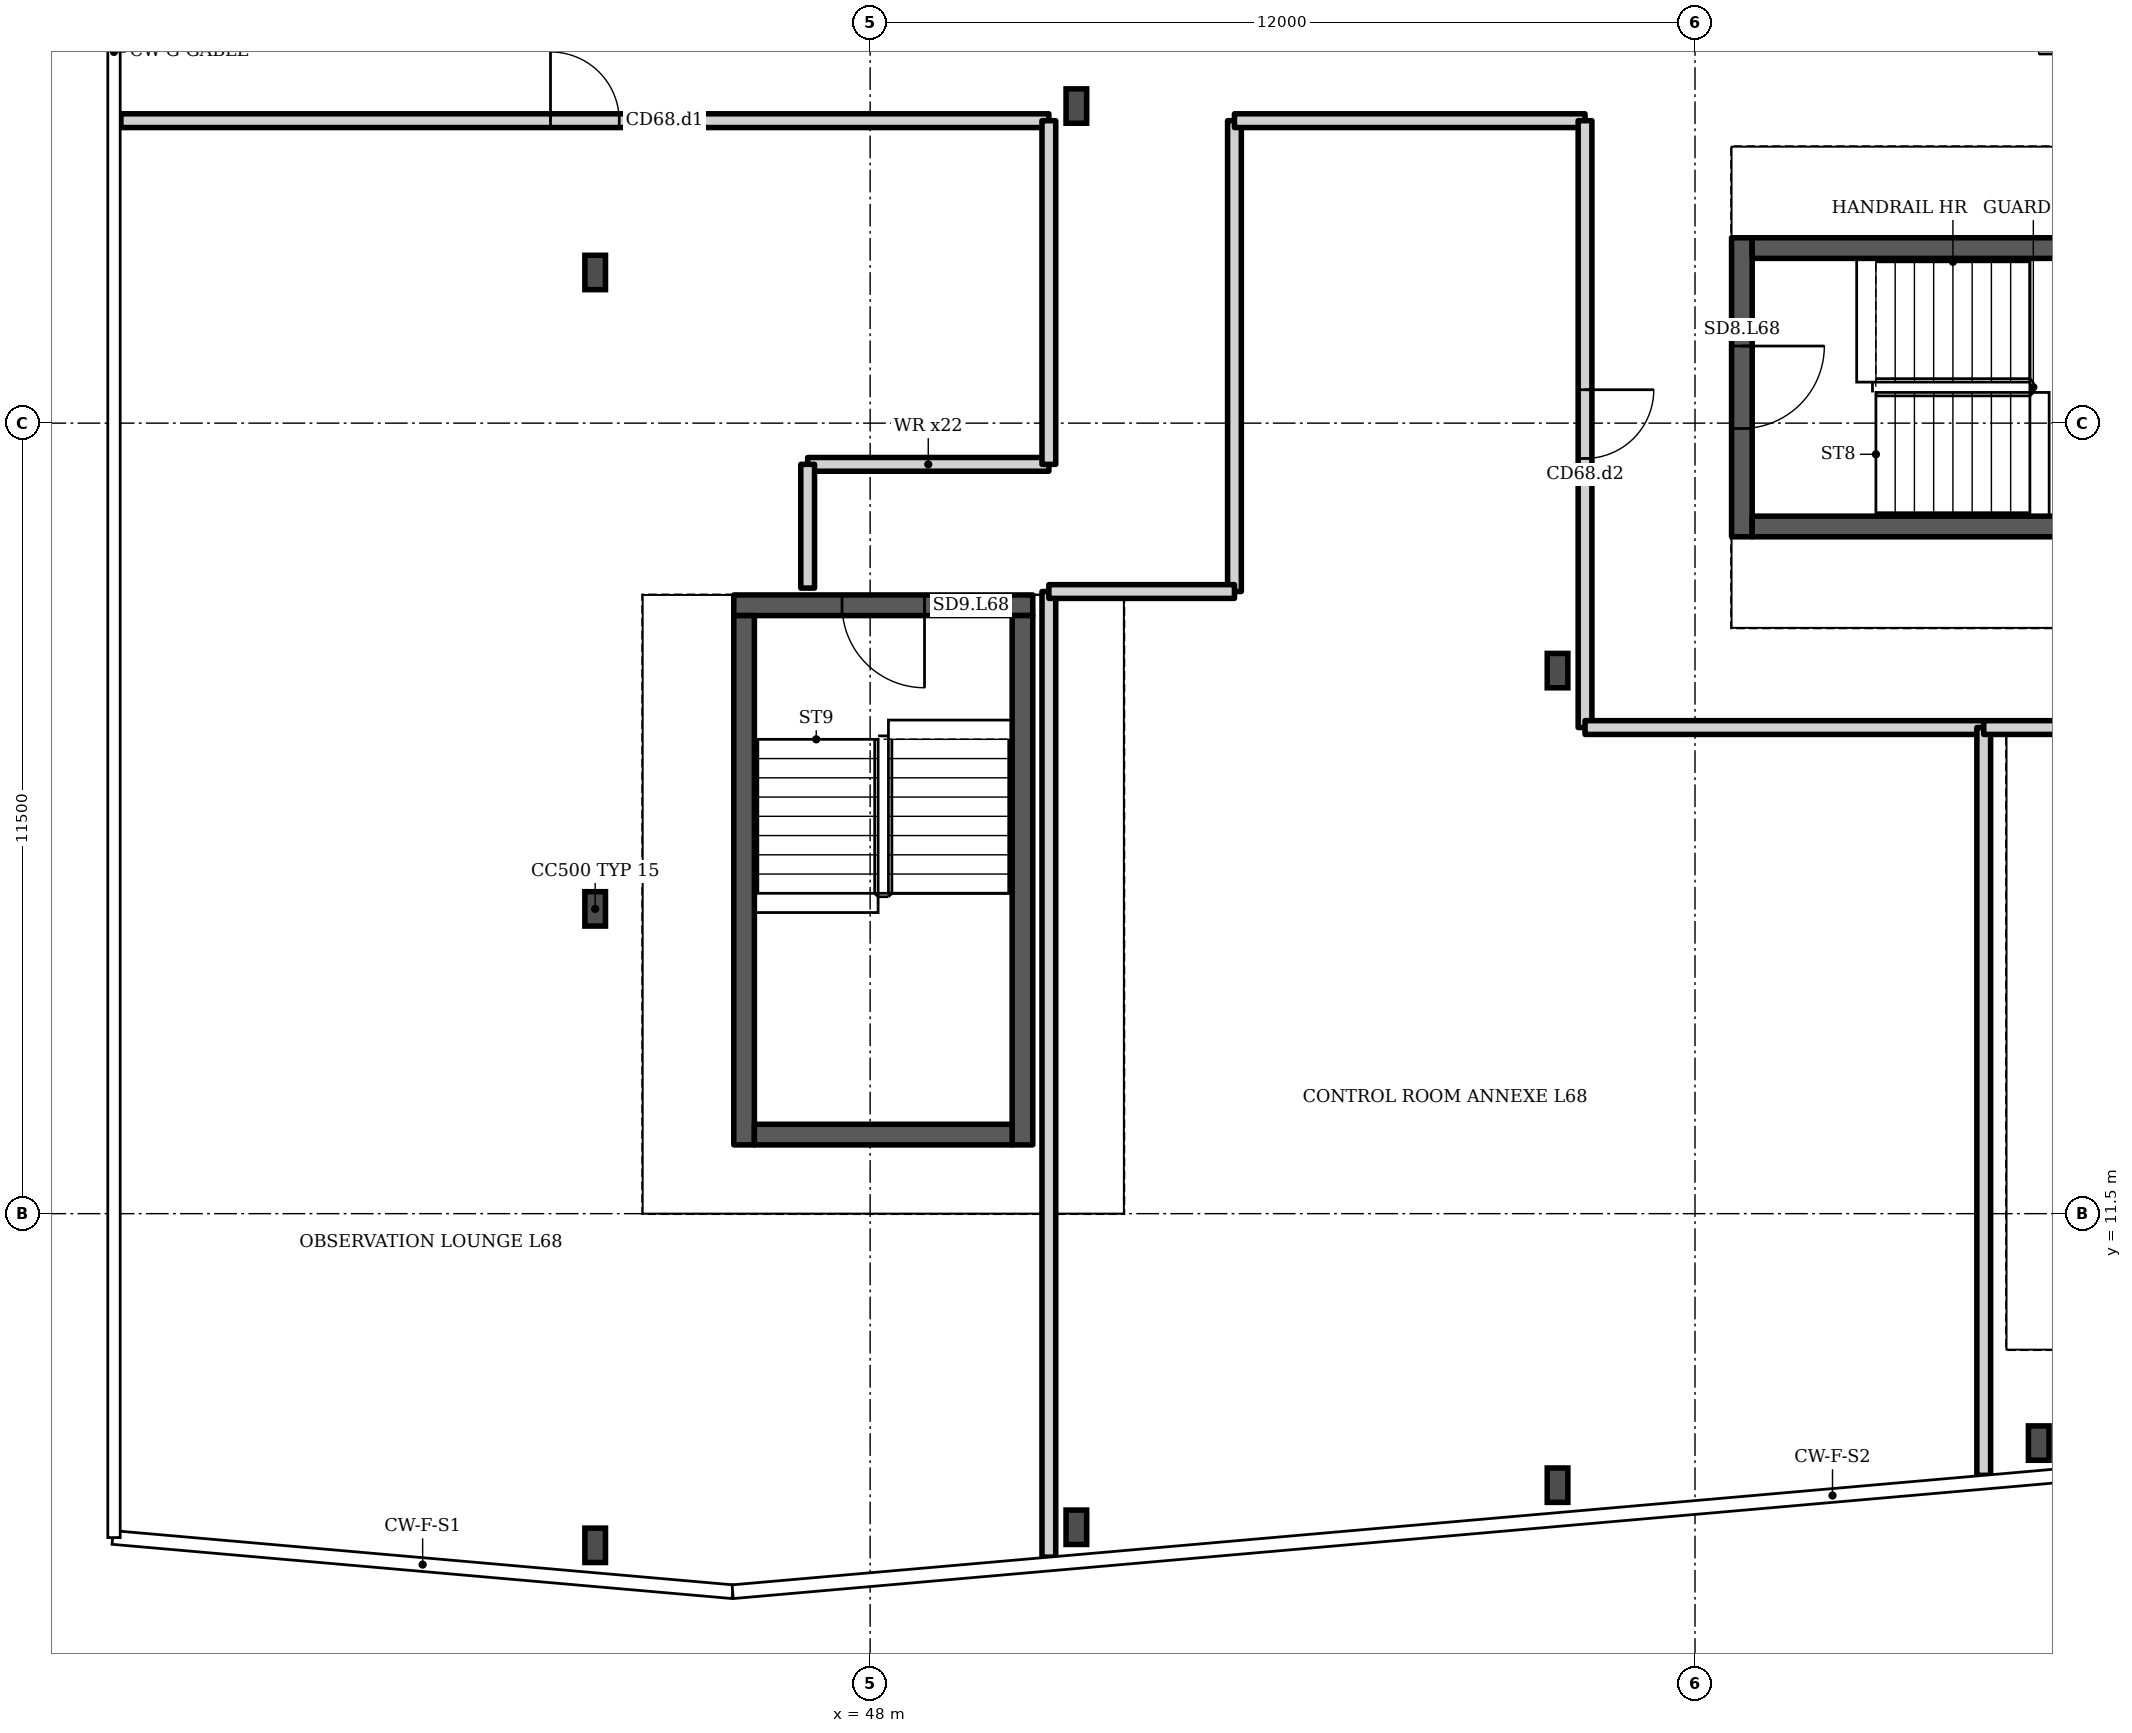
"""IFC4 building model, lengths in metres.
Left out: names, types, materials, properties, quantities, classifications, styles, units other than length and angle.
Written with IfcOpenShell. Run it as: python <this file> out.ifc"""

import sys

from ifc_helpers import new_model, si_unit, direction, frame, frame_2d, origin, origin_2d, place, context, subcontext, project, spatial, rectangle, i_section, extrude, element, fill, save


model = new_model("IFC4")
c1 = context("Model", 3, precision=1e-05, world=origin(), true_north=direction((0.0, 1.0)))
c2 = subcontext(c1, "Body", "Model", "MODEL_VIEW")
j1 = project(units=[si_unit("LENGTHUNIT", "METRE"), si_unit("PLANEANGLEUNIT", "RADIAN")], contexts=[c1])
p1 = place(None, origin())
s1 = spatial("IfcSite", under=j1, at=p1, CompositionType="ELEMENT")
p2 = place(p1, origin())
s2 = spatial("IfcBuilding", under=s1, at=p2, CompositionType="ELEMENT")
p3 = place(p2, frame((0.0, 0.0, 264.3)))
s3 = spatial("IfcBuildingStorey", under=s2, at=p3, CompositionType="ELEMENT", Elevation=264.3)
for number, where, z_axis, x_axis in (
    (1, (37.0, 7.288, 0.0), (0.0, 0.0, 1.0), (1.0, 0.0, 0.0)),
    (2, (37.0, 16.342, 0.0), (0.0, 0.0, 1.0), (1.0, 0.0, 0.0)),
    (3, (37.0, 25.396, 0.0), (0.0, 0.0, 1.0), (1.0, 0.0, 0.0)),
):
    element("IfcColumn", number, at=place(p3, frame(where, z_axis=z_axis, x_axis=x_axis)), inside=s3, PredefinedType="COLUMN", context=c2, shape_type="SweptSolid", body=[
        extrude(i_section(OverallWidth=0.3, OverallDepth=0.5, WebThickness=0.014, FlangeThickness=0.028, FilletRadius=0.027, at=origin_2d()), origin(), (0.0, 0.0, 1.0), 4.822),
    ])
p4 = place(p2, frame((0.0, 0.0, 267.5)))
s4 = spatial("IfcBuildingStorey", under=s2, at=p4, CompositionType="ELEMENT", Elevation=267.5)
for number, where, z_axis, x_axis in (
    (4, (44.0, 6.675, 0.0), (0.0, 0.0, 1.0), (1.0, 0.0, 0.0)),
    (5, (44.0, 15.934, 0.0), (0.0, 0.0, 1.0), (1.0, 0.0, 0.0)),
    (6, (44.0, 25.192, 0.0), (0.0, 0.0, 1.0), (1.0, 0.0, 0.0)),
):
    element("IfcColumn", number, at=place(p4, frame(where, z_axis=z_axis, x_axis=x_axis)), inside=s4, PredefinedType="COLUMN", context=c2, shape_type="SweptSolid", body=[
        extrude(i_section(OverallWidth=0.3, OverallDepth=0.5, WebThickness=0.014, FlangeThickness=0.028, FilletRadius=0.027, at=origin_2d()), origin(), (0.0, 0.0, 1.0), 4.45),
    ])
for number, where, z_axis, x_axis in (
    (7, (51.0, 6.938, 0.0), (0.0, 0.0, 1.0), (1.0, 0.0, 0.0)),
    (8, (51.0, 27.613, 0.0), (0.0, 0.0, 1.0), (1.0, 0.0, 0.0)),
    (9, (58.0, 7.55, 0.0), (0.0, 0.0, 1.0), (1.0, 0.0, 0.0)),
    (10, (58.0, 19.4, 0.0), (0.0, 0.0, 1.0), (1.0, 0.0, 0.0)),
    (11, (65.0, 8.163, 0.0), (0.0, 0.0, 1.0), (1.0, 0.0, 0.0)),
):
    element("IfcColumn", number, at=place(p4, frame(where, z_axis=z_axis, x_axis=x_axis)), inside=s4, PredefinedType="COLUMN", context=c2, shape_type="SweptSolid", body=[
        extrude(i_section(OverallWidth=0.3, OverallDepth=0.5, WebThickness=0.014, FlangeThickness=0.028, FilletRadius=0.027, at=origin_2d()), origin(), (0.0, 0.0, 1.0), 3.2),
    ])
p5 = place(p4, frame((37.1, 27.4, 0.0), z_axis=(0.0, 0.0, 1.0), x_axis=(1.0, 0.0, 0.0)))
e12 = element("IfcWall", 12, at=p5, inside=s4, PredefinedType="PARTITIONING", context=c2, shape_type="SweptSolid", body=[
    extrude(rectangle(XDim=13.5, YDim=0.2, at=frame_2d((6.75, 0.0))), origin(), (0.0, 0.0, 1.0), 2.8),
])
p6 = place(p5, frame((6.25, 0.0, 0.0)))
e13 = element("IfcOpeningElement", 13, at=p6, cuts=e12, PredefinedType="OPENING", context=c2, shape_type="SweptSolid", body=[
    extrude(rectangle(XDim=1.0, YDim=2.1, at=frame_2d((0.5, 1.05))), frame((0.0, 0.11, 0.0), z_axis=(0.0, -1.0, 0.0), x_axis=(1.0, 0.0, 0.0)), (0.0, 0.0, 1.0), 0.22),
])
p7 = place(p4, frame((50.6, 22.4, 0.0), z_axis=(0.0, 0.0, 1.0), x_axis=(-1.0, 0.0, 0.0)))
e14 = element("IfcWall", 14, at=p7, inside=s4, PredefinedType="PARTITIONING", context=c2, shape_type="SweptSolid", body=[
    extrude(rectangle(XDim=3.509, YDim=0.2, at=frame_2d((1.754, 0.0))), origin(), (0.0, 0.0, 1.0), 2.8),
])
p8 = place(p4, frame((47.091, 22.4, 0.0), z_axis=(0.0, 0.0, 1.0), x_axis=(0.0, -1.0, 0.0)))
e15 = element("IfcWall", 15, at=p8, inside=s4, PredefinedType="PARTITIONING", context=c2, shape_type="SweptSolid", body=[
    extrude(rectangle(XDim=1.8, YDim=0.2, at=frame_2d((0.9, 0.0))), origin(), (0.0, 0.0, 1.0), 2.8),
])
p9 = place(p4, frame((50.6, 20.55, 0.0), z_axis=(0.0, 0.0, 1.0), x_axis=(0.0, -1.0, 0.0)))
e16 = element("IfcWall", 16, at=p9, inside=s4, PredefinedType="PARTITIONING", context=c2, shape_type="SweptSolid", body=[
    extrude(rectangle(XDim=14.047, YDim=0.2, at=frame_2d((7.023, 0.0))), origin(), (0.0, 0.0, 1.0), 2.8),
])
p10 = place(p4, frame((53.3, 20.55, 0.0), z_axis=(0.0, 0.0, 1.0), x_axis=(0.0, 1.0, 0.0)))
e17 = element("IfcWall", 17, at=p10, inside=s4, PredefinedType="PARTITIONING", context=c2, shape_type="SweptSolid", body=[
    extrude(rectangle(XDim=6.85, YDim=0.2, at=frame_2d((3.425, 0.0))), origin(), (0.0, 0.0, 1.0), 2.8),
])
p11 = place(p4, frame((53.3, 27.4, 0.0), z_axis=(0.0, 0.0, 1.0), x_axis=(1.0, 0.0, 0.0)))
e18 = element("IfcWall", 18, at=p11, inside=s4, PredefinedType="PARTITIONING", context=c2, shape_type="SweptSolid", body=[
    extrude(rectangle(XDim=5.1, YDim=0.2, at=frame_2d((2.55, 0.0))), origin(), (0.0, 0.0, 1.0), 2.8),
])
p12 = place(p4, frame((58.4, 27.4, 0.0), z_axis=(0.0, 0.0, 1.0), x_axis=(0.0, -1.0, 0.0)))
e19 = element("IfcWall", 19, at=p12, inside=s4, PredefinedType="PARTITIONING", context=c2, shape_type="SweptSolid", body=[
    extrude(rectangle(XDim=8.828, YDim=0.2, at=frame_2d((4.414, 0.0))), origin(), (0.0, 0.0, 1.0), 2.8),
])
p13 = place(p12, frame((3.914, 0.0, 0.0)))
e20 = element("IfcOpeningElement", 20, at=p13, cuts=e19, PredefinedType="OPENING", context=c2, shape_type="SweptSolid", body=[
    extrude(rectangle(XDim=1.0, YDim=2.1, at=frame_2d((0.5, 1.05))), frame((0.0, 0.11, 0.0), z_axis=(0.0, -1.0, 0.0), x_axis=(1.0, 0.0, 0.0)), (0.0, 0.0, 1.0), 0.22),
])
p14 = place(p4, frame((58.4, 18.572, 0.0), z_axis=(0.0, 0.0, 1.0), x_axis=(1.0, 0.0, 0.0)))
e21 = element("IfcWall", 21, at=p14, inside=s4, PredefinedType="PARTITIONING", context=c2, shape_type="SweptSolid", body=[
    extrude(rectangle(XDim=5.8, YDim=0.2, at=frame_2d((2.9, 0.0))), origin(), (0.0, 0.0, 1.0), 2.8),
])
p15 = place(p4, frame((50.6, 20.55, 0.0), z_axis=(0.0, 0.0, 1.0), x_axis=(1.0, 0.0, 0.0)))
e22 = element("IfcWall", 22, at=p15, inside=s4, PredefinedType="PARTITIONING", context=c2, shape_type="SweptSolid", body=[
    extrude(rectangle(XDim=2.7, YDim=0.2, at=frame_2d((1.35, 0.0))), origin(), (0.0, 0.0, 1.0), 2.8),
])
p16 = place(p4, frame((64.2, 18.572, 0.0), z_axis=(0.0, 0.0, 1.0), x_axis=(0.0, -1.0, 0.0)))
e23 = element("IfcWall", 23, at=p16, inside=s4, PredefinedType="PARTITIONING", context=c2, shape_type="SweptSolid", body=[
    extrude(rectangle(XDim=10.879, YDim=0.2, at=frame_2d((5.439, 0.0))), origin(), (0.0, 0.0, 1.0), 2.8),
])
p17 = place(p4, frame((64.2, 18.572, 0.0), z_axis=(0.0, 0.0, 1.0), x_axis=(1.0, 0.0, 0.0)))
e24 = element("IfcWall", 24, at=p17, inside=s4, PredefinedType="PARTITIONING", context=c2, shape_type="SweptSolid", body=[
    extrude(rectangle(XDim=1.557, YDim=0.2, at=frame_2d((0.778, 0.0))), origin(), (0.0, 0.0, 1.0), 2.8),
])
p18 = place(p4, frame((50.6, 27.4, 0.0), z_axis=(0.0, 0.0, 1.0), x_axis=(0.0, -1.0, 0.0)))
e25 = element("IfcWall", 25, at=p18, inside=s4, PredefinedType="PARTITIONING", context=c2, shape_type="SweptSolid", body=[
    extrude(rectangle(XDim=5.0, YDim=0.2, at=frame_2d((2.5, 0.0))), origin(), (0.0, 0.0, 1.0), 2.8),
])
p19 = place(p4, frame((60.682, 21.347, 0.0), z_axis=(0.0, 0.0, 1.0), x_axis=(0.0, 1.0, 0.0)))
e26 = element("IfcWall", 26, at=p19, inside=s4, PredefinedType="SHEAR", context=c2, shape_type="SweptSolid", body=[
    extrude(rectangle(XDim=4.35, YDim=0.3, at=frame_2d((2.175, 0.0))), origin(), (0.0, 0.0, 1.0), 2.8),
])
p20 = place(p19, frame((1.575, 0.0, 0.0)))
e27 = element("IfcOpeningElement", 27, at=p20, cuts=e26, PredefinedType="OPENING", context=c2, shape_type="SweptSolid", body=[
    extrude(rectangle(XDim=1.2, YDim=2.1, at=frame_2d((0.6, 1.05))), frame((0.0, 0.16, 0.0), z_axis=(0.0, -1.0, 0.0), x_axis=(1.0, 0.0, 0.0)), (0.0, 0.0, 1.0), 0.32),
])
p21 = place(p4, frame((46.016, 20.35, 0.0), z_axis=(0.0, 0.0, 1.0), x_axis=(1.0, 0.0, 0.0)))
e28 = element("IfcWall", 28, at=p21, inside=s4, PredefinedType="SHEAR", context=c2, shape_type="SweptSolid", body=[
    extrude(rectangle(XDim=4.35, YDim=0.3, at=frame_2d((2.175, 0.0))), origin(), (0.0, 0.0, 1.0), 2.8),
])
p22 = place(p21, frame((1.575, 0.0, 0.0)))
e29 = element("IfcOpeningElement", 29, at=p22, cuts=e28, PredefinedType="OPENING", context=c2, shape_type="SweptSolid", body=[
    extrude(rectangle(XDim=1.2, YDim=2.1, at=frame_2d((0.6, 1.05))), frame((0.0, 0.16, 0.0), z_axis=(0.0, -1.0, 0.0), x_axis=(1.0, 0.0, 0.0)), (0.0, 0.0, 1.0), 0.32),
])
for number, where, z_axis, x_axis in (
    (30, (60.832, 21.497, 0.0), (0.0, 0.0, 1.0), (1.0, 0.0, 0.0)),
    (31, (60.832, 25.547, 0.0), (0.0, 0.0, 1.0), (1.0, 0.0, 0.0)),
    (32, (46.166, 12.5, 0.0), (0.0, 0.0, 1.0), (0.0, 1.0, 0.0)),
    (33, (50.216, 12.5, 0.0), (0.0, 0.0, 1.0), (0.0, 1.0, 0.0)),
):
    element("IfcWall", number, at=place(p4, frame(where, z_axis=z_axis, x_axis=x_axis)), inside=s4, PredefinedType="SHEAR", context=c2, shape_type="SweptSolid", body=[
        extrude(rectangle(XDim=7.7, YDim=0.3, at=frame_2d((3.85, 0.0))), origin(), (0.0, 0.0, 1.0), 2.8),
    ])
p23 = place(p4, frame((46.316, 12.65, 0.0), z_axis=(0.0, 0.0, 1.0), x_axis=(1.0, 0.0, 0.0)))
e34 = element("IfcWall", 34, at=p23, inside=s4, PredefinedType="SHEAR", context=c2, shape_type="SweptSolid", body=[
    extrude(rectangle(XDim=3.75, YDim=0.3, at=frame_2d((1.875, 0.0))), origin(), (0.0, 0.0, 1.0), 2.8),
])
p24 = place(p6, origin())
e35 = element("IfcDoor", 35, at=p24, inside=s4, OperationType="SINGLE_SWING_LEFT", PredefinedType="DOOR", context=c2, shape_type="SweptSolid", body=[
    extrude(rectangle(XDim=1.0, YDim=2.1, at=frame_2d((0.5, 1.05))), frame((0.0, 0.025, 0.0), z_axis=(0.0, -1.0, 0.0), x_axis=(1.0, 0.0, 0.0)), (0.0, 0.0, 1.0), 0.05),
])
fill(e13, e35)
p25 = place(p13, origin())
e36 = element("IfcDoor", 36, at=p25, inside=s4, OperationType="SINGLE_SWING_LEFT", PredefinedType="DOOR", context=c2, shape_type="SweptSolid", body=[
    extrude(rectangle(XDim=1.0, YDim=2.1, at=frame_2d((0.5, 1.05))), frame((0.0, 0.025, 0.0), z_axis=(0.0, -1.0, 0.0), x_axis=(1.0, 0.0, 0.0)), (0.0, 0.0, 1.0), 0.05),
])
fill(e20, e36)
p26 = place(p20, origin())
e37 = element("IfcDoor", 37, at=p26, inside=s4, OperationType="SINGLE_SWING_RIGHT", PredefinedType="DOOR", context=c2, shape_type="SweptSolid", body=[
    extrude(rectangle(XDim=1.2, YDim=2.1, at=frame_2d((0.6, 1.05))), frame((0.0, 0.025, 0.0), z_axis=(0.0, -1.0, 0.0), x_axis=(1.0, 0.0, 0.0)), (0.0, 0.0, 1.0), 0.05),
])
fill(e27, e37)
p27 = place(p22, origin())
e38 = element("IfcDoor", 38, at=p27, inside=s4, OperationType="SINGLE_SWING_RIGHT", PredefinedType="DOOR", context=c2, shape_type="SweptSolid", body=[
    extrude(rectangle(XDim=1.2, YDim=2.1, at=frame_2d((0.6, 1.05))), frame((0.0, 0.025, 0.0), z_axis=(0.0, -1.0, 0.0), x_axis=(1.0, 0.0, 0.0)), (0.0, 0.0, 1.0), 0.05),
])
fill(e29, e38)
save(model, sys.argv[1])
